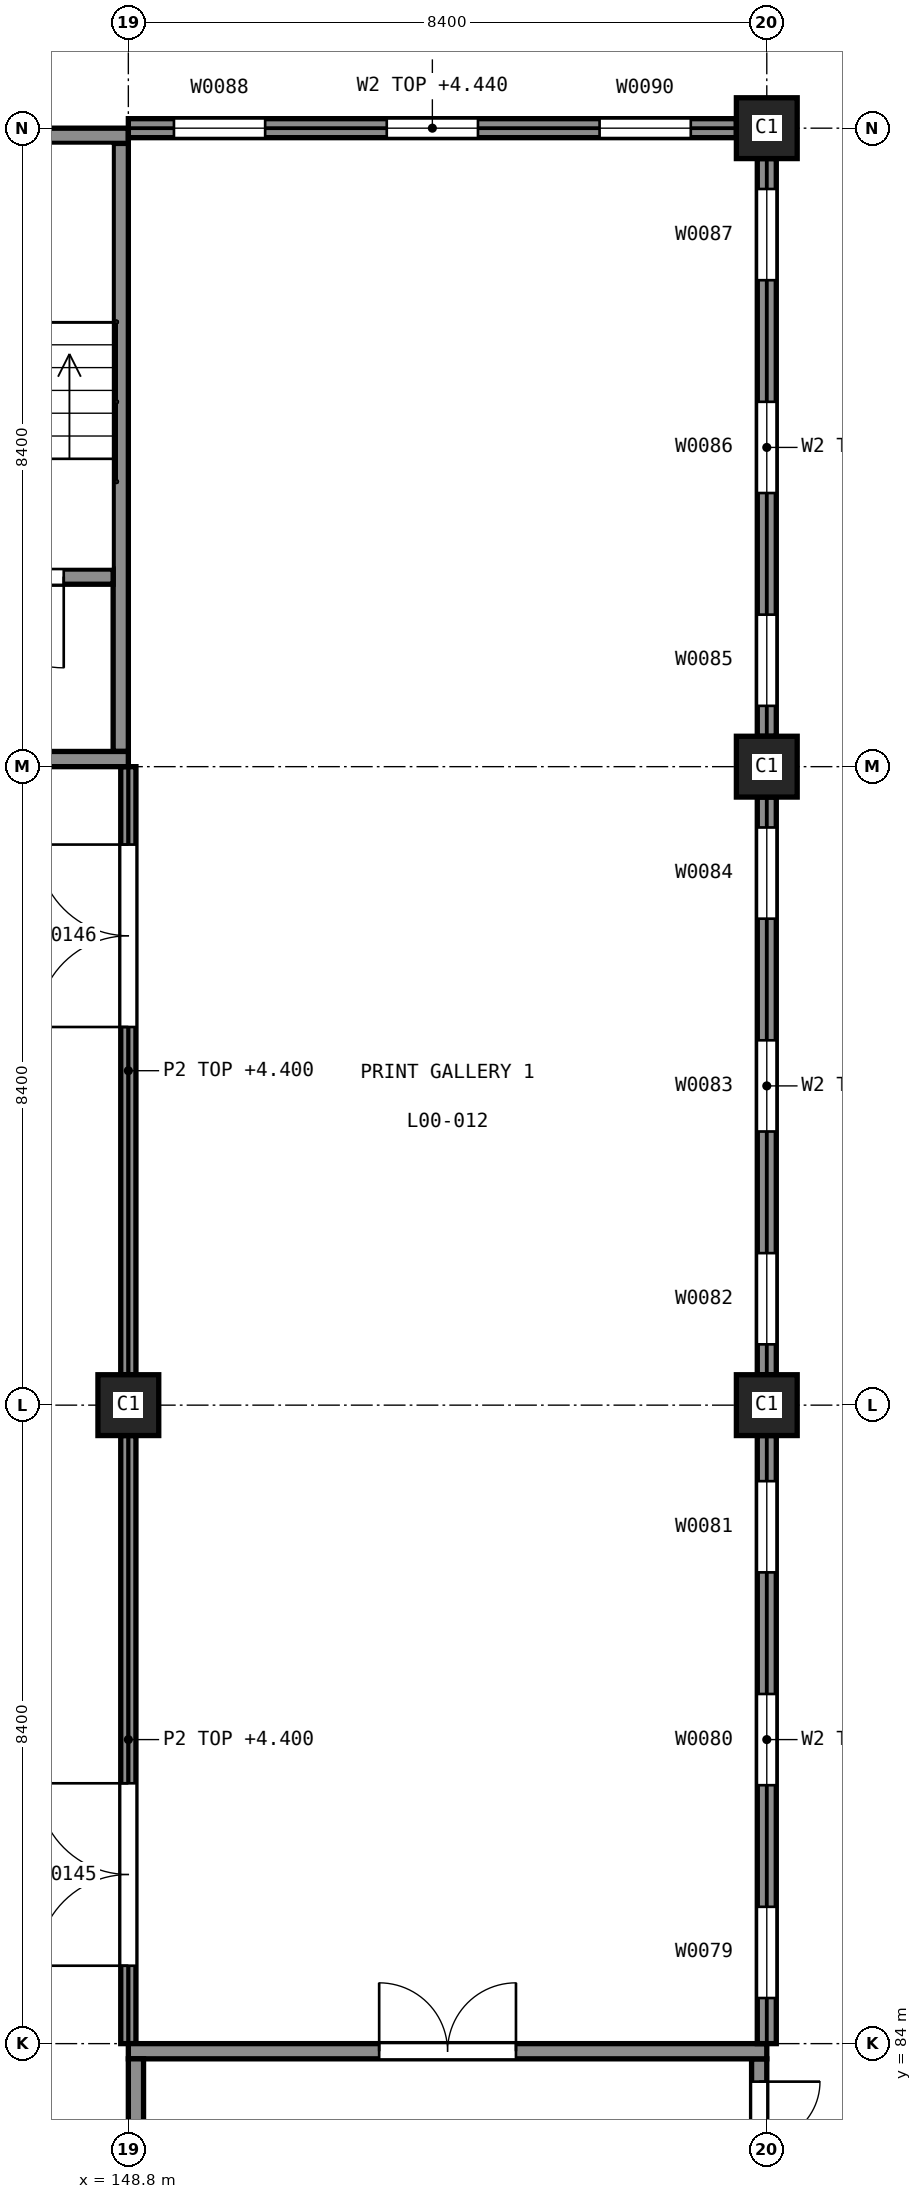
"""IFC4 building model, lengths in metres.
Left out: names, types, materials, properties, quantities, classifications, styles, units other than length and angle.
Written with IfcOpenShell. Run it as: python <this file> out.ifc"""

import sys

from ifc_helpers import new_model, si_unit, direction, frame, frame_2d, origin, origin_2d, place, context, subcontext, project, spatial, rectangle, extrude, element, fill, save


model = new_model("IFC4")
c1 = context("Model", 3, precision=1e-05, world=origin(), true_north=direction((0.0, 1.0)))
c2 = subcontext(c1, "Body", "Model", "MODEL_VIEW")
j1 = project(units=[si_unit("LENGTHUNIT", "METRE"), si_unit("PLANEANGLEUNIT", "RADIAN")], contexts=[c1])
p1 = place(None, origin())
s1 = spatial("IfcSite", under=j1, at=p1, CompositionType="ELEMENT")
p2 = place(p1, origin())
s2 = spatial("IfcBuilding", under=s1, at=p2, CompositionType="ELEMENT")
p3 = place(p2, origin())
s3 = spatial("IfcBuildingStorey", under=s2, at=p3, CompositionType="ELEMENT", Elevation=0.0)
p4 = place(p3, frame((140.4, 100.9, -1.8), z_axis=(0.0, 0.0, 1.0), x_axis=(1.0, 0.0, 0.0)))
e1 = element("IfcWall", 1, at=p4, inside=s3, PredefinedType="SHEAR", context=c2, shape_type="SweptSolid", body=[
    extrude(rectangle(XDim=8.4, YDim=0.2, at=frame_2d((4.2, 0.0))), origin(), (0.0, 0.0, 1.0), 7.3),
])
p5 = place(p4, frame((3.3, 0.0, 1.8)))
e2 = element("IfcOpeningElement", 2, at=p5, cuts=e1, PredefinedType="OPENING", context=c2, shape_type="SweptSolid", body=[
    extrude(rectangle(XDim=1.8, YDim=2.1, at=frame_2d((0.9, 1.05))), frame((0.0, 0.11, 0.0), z_axis=(0.0, -1.0, 0.0), x_axis=(1.0, 0.0, 0.0)), (0.0, 0.0, 1.0), 0.22),
])
p6 = place(p3, frame((140.4, 109.1, -1.8), z_axis=(0.0, 0.0, 1.0), x_axis=(1.0, 0.0, 0.0)))
e3 = element("IfcWall", 3, at=p6, inside=s3, PredefinedType="SHEAR", context=c2, shape_type="SweptSolid", body=[
    extrude(rectangle(XDim=8.4, YDim=0.2, at=frame_2d((4.2, 0.0))), origin(), (0.0, 0.0, 1.0), 7.3),
])
p7 = place(p6, frame((3.001, 0.0, 1.8)))
e4 = element("IfcOpeningElement", 4, at=p7, cuts=e3, PredefinedType="OPENING", context=c2, shape_type="SweptSolid", body=[
    extrude(rectangle(XDim=2.4, YDim=2.1, at=frame_2d((1.2, 1.05))), frame((0.0, 0.11, 0.0), z_axis=(0.0, -1.0, 0.0), x_axis=(1.0, 0.0, 0.0)), (0.0, 0.0, 1.0), 0.22),
])
p8 = place(p3, frame((148.7, 101.0, -1.8), z_axis=(0.0, 0.0, 1.0), x_axis=(0.0, 1.0, 0.0)))
e5 = element("IfcWall", 5, at=p8, inside=s3, PredefinedType="SHEAR", context=c2, shape_type="SweptSolid", body=[
    extrude(rectangle(XDim=8.0, YDim=0.2, at=frame_2d((4.0, 0.0))), origin(), (0.0, 0.0, 1.0), 7.3),
])
p9 = place(p3, frame((140.6, 103.3, -1.8), z_axis=(0.0, 0.0, 1.0), x_axis=(1.0, 0.0, 0.0)))
e6 = element("IfcWall", 6, at=p9, inside=s3, PredefinedType="SHEAR", context=c2, shape_type="SweptSolid", body=[
    extrude(rectangle(XDim=8.0, YDim=0.2, at=frame_2d((4.0, 0.0))), origin(), (0.0, 0.0, 1.0), 7.3),
])
p10 = place(p9, frame((0.65, 0.0, 1.8)))
e7 = element("IfcOpeningElement", 7, at=p10, cuts=e6, PredefinedType="OPENING", context=c2, shape_type="SweptSolid", body=[
    extrude(rectangle(XDim=1.2, YDim=2.1, at=frame_2d((0.6, 1.05))), frame((0.0, 0.11, 0.0), z_axis=(0.0, -1.0, 0.0), x_axis=(1.0, 0.0, 0.0)), (0.0, 0.0, 1.0), 0.22),
])
p11 = place(p9, frame((6.15, 0.0, 1.8)))
e8 = element("IfcOpeningElement", 8, at=p11, cuts=e6, PredefinedType="OPENING", context=c2, shape_type="SweptSolid", body=[
    extrude(rectangle(XDim=1.2, YDim=2.1, at=frame_2d((0.6, 1.05))), frame((0.0, 0.11, 0.0), z_axis=(0.0, -1.0, 0.0), x_axis=(1.0, 0.0, 0.0)), (0.0, 0.0, 1.0), 0.22),
])
p12 = place(p3, frame((148.8, 83.9, -1.8), z_axis=(0.0, 0.0, 1.0), x_axis=(1.0, 0.0, 0.0)))
e9 = element("IfcWall", 9, at=p12, inside=s3, PredefinedType="SHEAR", context=c2, shape_type="SweptSolid", body=[
    extrude(rectangle(XDim=8.4, YDim=0.2, at=frame_2d((4.2, 0.0))), origin(), (0.0, 0.0, 1.0), 7.3),
])
p13 = place(p12, frame((3.3, 0.0, 1.8)))
e10 = element("IfcOpeningElement", 10, at=p13, cuts=e9, PredefinedType="OPENING", context=c2, shape_type="SweptSolid", body=[
    extrude(rectangle(XDim=1.8, YDim=2.1, at=frame_2d((0.9, 1.05))), frame((0.0, 0.11, 0.0), z_axis=(0.0, -1.0, 0.0), x_axis=(1.0, 0.0, 0.0)), (0.0, 0.0, 1.0), 0.22),
])
p14 = place(p3, frame((148.9, 75.8, -1.8), z_axis=(0.0, 0.0, 1.0), x_axis=(0.0, 1.0, 0.0)))
e11 = element("IfcWall", 11, at=p14, inside=s3, PredefinedType="SHEAR", context=c2, shape_type="SweptSolid", body=[
    extrude(rectangle(XDim=8.0, YDim=0.2, at=frame_2d((4.0, 0.0))), origin(), (0.0, 0.0, 1.0), 7.3),
])
p15 = place(p3, frame((157.1, 83.8, -1.8), z_axis=(0.0, 0.0, 1.0), x_axis=(0.0, -1.0, 0.0)))
e12 = element("IfcWall", 12, at=p15, inside=s3, PredefinedType="SHEAR", context=c2, shape_type="SweptSolid", body=[
    extrude(rectangle(XDim=8.0, YDim=0.2, at=frame_2d((4.0, 0.0))), origin(), (0.0, 0.0, 1.0), 7.3),
])
p16 = place(p15, frame((0.3, 0.0, 1.8)))
e13 = element("IfcOpeningElement", 13, at=p16, cuts=e12, PredefinedType="OPENING", context=c2, shape_type="SweptSolid", body=[
    extrude(rectangle(XDim=1.6, YDim=2.1, at=frame_2d((0.8, 1.05))), frame((0.0, 0.11, 0.0), z_axis=(0.0, -1.0, 0.0), x_axis=(1.0, 0.0, 0.0)), (0.0, 0.0, 1.0), 0.22),
])
for number, where, z_axis, x_axis in (
    (14, (148.8, 92.4, -0.3), (0.0, 0.0, 1.0), (1.0, 0.0, 0.0)),
    (15, (157.2, 92.4, -0.3), (0.0, 0.0, 1.0), (1.0, 0.0, 0.0)),
    (16, (157.2, 100.8, -0.3), (0.0, 0.0, 1.0), (1.0, 0.0, 0.0)),
    (17, (157.2, 109.2, -0.3), (0.0, 0.0, 1.0), (1.0, 0.0, 0.0)),
):
    element("IfcColumn", number, at=place(p3, frame(where, z_axis=z_axis, x_axis=x_axis)), inside=s3, PredefinedType="COLUMN", context=c2, shape_type="SweptSolid", body=[
        extrude(rectangle(XDim=0.8, YDim=0.8, at=origin_2d()), origin(), (0.0, 0.0, 1.0), 5.8),
    ])
p17 = place(p3, frame((157.2, 84.0, 0.0), z_axis=(0.0, 0.0, 1.0), x_axis=(0.0, 1.0, 0.0)))
e18 = element("IfcWall", 18, at=p17, inside=s3, PredefinedType="SOLIDWALL", context=c2, shape_type="SweptSolid", body=[
    extrude(rectangle(XDim=8.0, YDim=0.25, at=frame_2d((4.0, 0.0))), origin(), (0.0, 0.0, 1.0), 4.44),
])
p18 = place(p17, frame((0.6, 0.0, 0.9)))
e19 = element("IfcOpeningElement", 19, at=p18, cuts=e18, PredefinedType="OPENING", context=c2, shape_type="SweptSolid", body=[
    extrude(rectangle(XDim=1.2, YDim=2.1, at=frame_2d((0.6, 1.05))), frame((0.0, 0.135, 0.0), z_axis=(0.0, -1.0, 0.0), x_axis=(1.0, 0.0, 0.0)), (0.0, 0.0, 1.0), 0.27),
])
p19 = place(p17, frame((3.4, 0.0, 0.9)))
e20 = element("IfcOpeningElement", 20, at=p19, cuts=e18, PredefinedType="OPENING", context=c2, shape_type="SweptSolid", body=[
    extrude(rectangle(XDim=1.2, YDim=2.1, at=frame_2d((0.6, 1.05))), frame((0.0, 0.135, 0.0), z_axis=(0.0, -1.0, 0.0), x_axis=(1.0, 0.0, 0.0)), (0.0, 0.0, 1.0), 0.27),
])
p20 = place(p17, frame((6.2, 0.0, 0.9)))
e21 = element("IfcOpeningElement", 21, at=p20, cuts=e18, PredefinedType="OPENING", context=c2, shape_type="SweptSolid", body=[
    extrude(rectangle(XDim=1.2, YDim=2.1, at=frame_2d((0.6, 1.05))), frame((0.0, 0.135, 0.0), z_axis=(0.0, -1.0, 0.0), x_axis=(1.0, 0.0, 0.0)), (0.0, 0.0, 1.0), 0.27),
])
p21 = place(p3, frame((157.2, 92.8, 0.0), z_axis=(0.0, 0.0, 1.0), x_axis=(0.0, 1.0, 0.0)))
e22 = element("IfcWall", 22, at=p21, inside=s3, PredefinedType="SOLIDWALL", context=c2, shape_type="SweptSolid", body=[
    extrude(rectangle(XDim=7.6, YDim=0.25, at=frame_2d((3.8, 0.0))), origin(), (0.0, 0.0, 1.0), 4.44),
])
p22 = place(p21, frame((0.4, 0.0, 0.9)))
e23 = element("IfcOpeningElement", 23, at=p22, cuts=e22, PredefinedType="OPENING", context=c2, shape_type="SweptSolid", body=[
    extrude(rectangle(XDim=1.2, YDim=2.1, at=frame_2d((0.6, 1.05))), frame((0.0, 0.135, 0.0), z_axis=(0.0, -1.0, 0.0), x_axis=(1.0, 0.0, 0.0)), (0.0, 0.0, 1.0), 0.27),
])
p23 = place(p21, frame((3.2, 0.0, 0.9)))
e24 = element("IfcOpeningElement", 24, at=p23, cuts=e22, PredefinedType="OPENING", context=c2, shape_type="SweptSolid", body=[
    extrude(rectangle(XDim=1.2, YDim=2.1, at=frame_2d((0.6, 1.05))), frame((0.0, 0.135, 0.0), z_axis=(0.0, -1.0, 0.0), x_axis=(1.0, 0.0, 0.0)), (0.0, 0.0, 1.0), 0.27),
])
p24 = place(p21, frame((6.0, 0.0, 0.9)))
e25 = element("IfcOpeningElement", 25, at=p24, cuts=e22, PredefinedType="OPENING", context=c2, shape_type="SweptSolid", body=[
    extrude(rectangle(XDim=1.2, YDim=2.1, at=frame_2d((0.6, 1.05))), frame((0.0, 0.135, 0.0), z_axis=(0.0, -1.0, 0.0), x_axis=(1.0, 0.0, 0.0)), (0.0, 0.0, 1.0), 0.27),
])
p25 = place(p3, frame((157.2, 101.2, 0.0), z_axis=(0.0, 0.0, 1.0), x_axis=(0.0, 1.0, 0.0)))
e26 = element("IfcWall", 26, at=p25, inside=s3, PredefinedType="SOLIDWALL", context=c2, shape_type="SweptSolid", body=[
    extrude(rectangle(XDim=7.6, YDim=0.25, at=frame_2d((3.8, 0.0))), origin(), (0.0, 0.0, 1.0), 4.44),
])
p26 = place(p25, frame((0.4, 0.0, 0.9)))
e27 = element("IfcOpeningElement", 27, at=p26, cuts=e26, PredefinedType="OPENING", context=c2, shape_type="SweptSolid", body=[
    extrude(rectangle(XDim=1.2, YDim=2.1, at=frame_2d((0.6, 1.05))), frame((0.0, 0.135, 0.0), z_axis=(0.0, -1.0, 0.0), x_axis=(1.0, 0.0, 0.0)), (0.0, 0.0, 1.0), 0.27),
])
p27 = place(p25, frame((3.2, 0.0, 0.9)))
e28 = element("IfcOpeningElement", 28, at=p27, cuts=e26, PredefinedType="OPENING", context=c2, shape_type="SweptSolid", body=[
    extrude(rectangle(XDim=1.2, YDim=2.1, at=frame_2d((0.6, 1.05))), frame((0.0, 0.135, 0.0), z_axis=(0.0, -1.0, 0.0), x_axis=(1.0, 0.0, 0.0)), (0.0, 0.0, 1.0), 0.27),
])
p28 = place(p25, frame((6.0, 0.0, 0.9)))
e29 = element("IfcOpeningElement", 29, at=p28, cuts=e26, PredefinedType="OPENING", context=c2, shape_type="SweptSolid", body=[
    extrude(rectangle(XDim=1.2, YDim=2.1, at=frame_2d((0.6, 1.05))), frame((0.0, 0.135, 0.0), z_axis=(0.0, -1.0, 0.0), x_axis=(1.0, 0.0, 0.0)), (0.0, 0.0, 1.0), 0.27),
])
p29 = place(p3, frame((148.8, 109.2, 0.0), z_axis=(0.0, 0.0, 1.0), x_axis=(1.0, 0.0, 0.0)))
e30 = element("IfcWall", 30, at=p29, inside=s3, PredefinedType="SOLIDWALL", context=c2, shape_type="SweptSolid", body=[
    extrude(rectangle(XDim=8.0, YDim=0.25, at=frame_2d((4.0, 0.0))), origin(), (0.0, 0.0, 1.0), 4.44),
])
p30 = place(p29, frame((0.6, 0.0, 0.9)))
e31 = element("IfcOpeningElement", 31, at=p30, cuts=e30, PredefinedType="OPENING", context=c2, shape_type="SweptSolid", body=[
    extrude(rectangle(XDim=1.2, YDim=2.1, at=frame_2d((0.6, 1.05))), frame((0.0, 0.135, 0.0), z_axis=(0.0, -1.0, 0.0), x_axis=(1.0, 0.0, 0.0)), (0.0, 0.0, 1.0), 0.27),
])
p31 = place(p29, frame((3.4, 0.0, 0.9)))
e32 = element("IfcOpeningElement", 32, at=p31, cuts=e30, PredefinedType="OPENING", context=c2, shape_type="SweptSolid", body=[
    extrude(rectangle(XDim=1.2, YDim=2.1, at=frame_2d((0.6, 1.05))), frame((0.0, 0.135, 0.0), z_axis=(0.0, -1.0, 0.0), x_axis=(1.0, 0.0, 0.0)), (0.0, 0.0, 1.0), 0.27),
])
p32 = place(p29, frame((6.2, 0.0, 0.9)))
e33 = element("IfcOpeningElement", 33, at=p32, cuts=e30, PredefinedType="OPENING", context=c2, shape_type="SweptSolid", body=[
    extrude(rectangle(XDim=1.2, YDim=2.1, at=frame_2d((0.6, 1.05))), frame((0.0, 0.135, 0.0), z_axis=(0.0, -1.0, 0.0), x_axis=(1.0, 0.0, 0.0)), (0.0, 0.0, 1.0), 0.27),
])
p33 = place(p3, frame((148.8, 84.0, 0.0), z_axis=(0.0, 0.0, 1.0), x_axis=(0.0, 1.0, 0.0)))
e34 = element("IfcWall", 34, at=p33, inside=s3, PredefinedType="PARTITIONING", context=c2, shape_type="SweptSolid", body=[
    extrude(rectangle(XDim=8.0, YDim=0.2, at=frame_2d((4.0, 0.0))), origin(), (0.0, 0.0, 1.0), 4.4),
])
p34 = place(p33, frame((1.025, 0.0, 0.0)))
e35 = element("IfcOpeningElement", 35, at=p34, cuts=e34, PredefinedType="OPENING", context=c2, shape_type="SweptSolid", body=[
    extrude(rectangle(XDim=2.4, YDim=2.4, at=frame_2d((1.2, 1.2))), frame((0.0, 0.11, 0.0), z_axis=(0.0, -1.0, 0.0), x_axis=(1.0, 0.0, 0.0)), (0.0, 0.0, 1.0), 0.22),
])
p35 = place(p3, frame((148.8, 92.8, 0.0), z_axis=(0.0, 0.0, 1.0), x_axis=(0.0, 1.0, 0.0)))
e36 = element("IfcWall", 36, at=p35, inside=s3, PredefinedType="PARTITIONING", context=c2, shape_type="SweptSolid", body=[
    extrude(rectangle(XDim=8.0, YDim=0.2, at=frame_2d((4.0, 0.0))), origin(), (0.0, 0.0, 1.0), 4.4),
])
p36 = place(p35, frame((4.575, 0.0, 0.0)))
e37 = element("IfcOpeningElement", 37, at=p36, cuts=e36, PredefinedType="OPENING", context=c2, shape_type="SweptSolid", body=[
    extrude(rectangle(XDim=2.4, YDim=2.4, at=frame_2d((1.2, 1.2))), frame((0.0, 0.11, 0.0), z_axis=(0.0, -1.0, 0.0), x_axis=(1.0, 0.0, 0.0)), (0.0, 0.0, 1.0), 0.22),
])
p37 = place(p18, origin())
e38 = element("IfcWindow", 38, at=p37, inside=s3, PartitioningType="SINGLE_PANEL", PredefinedType="WINDOW", context=c2, shape_type="SweptSolid", body=[
    extrude(rectangle(XDim=1.2, YDim=2.1, at=frame_2d((0.6, 1.05))), frame((0.0, 0.105, 0.0), z_axis=(0.0, -1.0, 0.0), x_axis=(1.0, 0.0, 0.0)), (0.0, 0.0, 1.0), 0.06),
])
fill(e19, e38)
p38 = place(p19, origin())
e39 = element("IfcWindow", 39, at=p38, inside=s3, PartitioningType="SINGLE_PANEL", PredefinedType="WINDOW", context=c2, shape_type="SweptSolid", body=[
    extrude(rectangle(XDim=1.2, YDim=2.1, at=frame_2d((0.6, 1.05))), frame((0.0, 0.105, 0.0), z_axis=(0.0, -1.0, 0.0), x_axis=(1.0, 0.0, 0.0)), (0.0, 0.0, 1.0), 0.06),
])
fill(e20, e39)
p39 = place(p20, origin())
e40 = element("IfcWindow", 40, at=p39, inside=s3, PartitioningType="SINGLE_PANEL", PredefinedType="WINDOW", context=c2, shape_type="SweptSolid", body=[
    extrude(rectangle(XDim=1.2, YDim=2.1, at=frame_2d((0.6, 1.05))), frame((0.0, 0.105, 0.0), z_axis=(0.0, -1.0, 0.0), x_axis=(1.0, 0.0, 0.0)), (0.0, 0.0, 1.0), 0.06),
])
fill(e21, e40)
p40 = place(p22, origin())
e41 = element("IfcWindow", 41, at=p40, inside=s3, PartitioningType="SINGLE_PANEL", PredefinedType="WINDOW", context=c2, shape_type="SweptSolid", body=[
    extrude(rectangle(XDim=1.2, YDim=2.1, at=frame_2d((0.6, 1.05))), frame((0.0, 0.105, 0.0), z_axis=(0.0, -1.0, 0.0), x_axis=(1.0, 0.0, 0.0)), (0.0, 0.0, 1.0), 0.06),
])
fill(e23, e41)
p41 = place(p23, origin())
e42 = element("IfcWindow", 42, at=p41, inside=s3, PartitioningType="SINGLE_PANEL", PredefinedType="WINDOW", context=c2, shape_type="SweptSolid", body=[
    extrude(rectangle(XDim=1.2, YDim=2.1, at=frame_2d((0.6, 1.05))), frame((0.0, 0.105, 0.0), z_axis=(0.0, -1.0, 0.0), x_axis=(1.0, 0.0, 0.0)), (0.0, 0.0, 1.0), 0.06),
])
fill(e24, e42)
p42 = place(p24, origin())
e43 = element("IfcWindow", 43, at=p42, inside=s3, PartitioningType="SINGLE_PANEL", PredefinedType="WINDOW", context=c2, shape_type="SweptSolid", body=[
    extrude(rectangle(XDim=1.2, YDim=2.1, at=frame_2d((0.6, 1.05))), frame((0.0, 0.105, 0.0), z_axis=(0.0, -1.0, 0.0), x_axis=(1.0, 0.0, 0.0)), (0.0, 0.0, 1.0), 0.06),
])
fill(e25, e43)
p43 = place(p26, origin())
e44 = element("IfcWindow", 44, at=p43, inside=s3, PartitioningType="SINGLE_PANEL", PredefinedType="WINDOW", context=c2, shape_type="SweptSolid", body=[
    extrude(rectangle(XDim=1.2, YDim=2.1, at=frame_2d((0.6, 1.05))), frame((0.0, 0.105, 0.0), z_axis=(0.0, -1.0, 0.0), x_axis=(1.0, 0.0, 0.0)), (0.0, 0.0, 1.0), 0.06),
])
fill(e27, e44)
p44 = place(p27, origin())
e45 = element("IfcWindow", 45, at=p44, inside=s3, PartitioningType="SINGLE_PANEL", PredefinedType="WINDOW", context=c2, shape_type="SweptSolid", body=[
    extrude(rectangle(XDim=1.2, YDim=2.1, at=frame_2d((0.6, 1.05))), frame((0.0, 0.105, 0.0), z_axis=(0.0, -1.0, 0.0), x_axis=(1.0, 0.0, 0.0)), (0.0, 0.0, 1.0), 0.06),
])
fill(e28, e45)
p45 = place(p28, origin())
e46 = element("IfcWindow", 46, at=p45, inside=s3, PartitioningType="SINGLE_PANEL", PredefinedType="WINDOW", context=c2, shape_type="SweptSolid", body=[
    extrude(rectangle(XDim=1.2, YDim=2.1, at=frame_2d((0.6, 1.05))), frame((0.0, 0.105, 0.0), z_axis=(0.0, -1.0, 0.0), x_axis=(1.0, 0.0, 0.0)), (0.0, 0.0, 1.0), 0.06),
])
fill(e29, e46)
p46 = place(p30, origin())
e47 = element("IfcWindow", 47, at=p46, inside=s3, PartitioningType="SINGLE_PANEL", PredefinedType="WINDOW", context=c2, shape_type="SweptSolid", body=[
    extrude(rectangle(XDim=1.2, YDim=2.1, at=frame_2d((0.6, 1.05))), frame((0.0, -0.045, 0.0), z_axis=(0.0, -1.0, 0.0), x_axis=(1.0, 0.0, 0.0)), (0.0, 0.0, 1.0), 0.06),
])
fill(e31, e47)
p47 = place(p31, origin())
e48 = element("IfcWindow", 48, at=p47, inside=s3, PartitioningType="SINGLE_PANEL", PredefinedType="WINDOW", context=c2, shape_type="SweptSolid", body=[
    extrude(rectangle(XDim=1.2, YDim=2.1, at=frame_2d((0.6, 1.05))), frame((0.0, -0.045, 0.0), z_axis=(0.0, -1.0, 0.0), x_axis=(1.0, 0.0, 0.0)), (0.0, 0.0, 1.0), 0.06),
])
fill(e32, e48)
p48 = place(p32, origin())
e49 = element("IfcWindow", 49, at=p48, inside=s3, PartitioningType="SINGLE_PANEL", PredefinedType="WINDOW", context=c2, shape_type="SweptSolid", body=[
    extrude(rectangle(XDim=1.2, YDim=2.1, at=frame_2d((0.6, 1.05))), frame((0.0, -0.045, 0.0), z_axis=(0.0, -1.0, 0.0), x_axis=(1.0, 0.0, 0.0)), (0.0, 0.0, 1.0), 0.06),
])
fill(e33, e49)
p49 = place(p16, origin())
e50 = element("IfcDoor", 50, at=p49, inside=s3, OperationType="DOUBLE_DOOR_SINGLE_SWING", PredefinedType="DOOR", context=c2, shape_type="SweptSolid", body=[
    extrude(rectangle(XDim=1.6, YDim=2.1, at=frame_2d((0.8, 1.05))), frame((0.0, 0.025, 0.0), z_axis=(0.0, -1.0, 0.0), x_axis=(1.0, 0.0, 0.0)), (0.0, 0.0, 1.0), 0.05),
])
fill(e13, e50)
p50 = place(p34, origin())
e51 = element("IfcDoor", 51, at=p50, inside=s3, OperationType="DOUBLE_DOOR_SINGLE_SWING", PredefinedType="DOOR", context=c2, shape_type="SweptSolid", body=[
    extrude(rectangle(XDim=2.4, YDim=2.4, at=frame_2d((1.2, 1.2))), frame((0.0, 0.025, 0.0), z_axis=(0.0, -1.0, 0.0), x_axis=(1.0, 0.0, 0.0)), (0.0, 0.0, 1.0), 0.05),
])
fill(e35, e51)
p51 = place(p36, origin())
e52 = element("IfcDoor", 52, at=p51, inside=s3, OperationType="DOUBLE_DOOR_SINGLE_SWING", PredefinedType="DOOR", context=c2, shape_type="SweptSolid", body=[
    extrude(rectangle(XDim=2.4, YDim=2.4, at=frame_2d((1.2, 1.2))), frame((0.0, 0.025, 0.0), z_axis=(0.0, -1.0, 0.0), x_axis=(1.0, 0.0, 0.0)), (0.0, 0.0, 1.0), 0.05),
])
fill(e37, e52)
p52 = place(p11, origin())
e53 = element("IfcDoor", 53, at=p52, inside=s3, OperationType="SINGLE_SWING_RIGHT", PredefinedType="DOOR", context=c2, shape_type="SweptSolid", body=[
    extrude(rectangle(XDim=1.2, YDim=2.1, at=frame_2d((0.6, 1.05))), frame((0.0, 0.025, 0.0), z_axis=(0.0, -1.0, 0.0), x_axis=(1.0, 0.0, 0.0)), (0.0, 0.0, 1.0), 0.05),
])
fill(e8, e53)
p53 = place(p13, origin())
e54 = element("IfcDoor", 54, at=p53, inside=s3, OperationType="DOUBLE_DOOR_SINGLE_SWING", PredefinedType="DOOR", context=c2, shape_type="SweptSolid", body=[
    extrude(rectangle(XDim=1.8, YDim=2.1, at=frame_2d((0.9, 1.05))), frame((0.0, 0.025, 0.0), z_axis=(0.0, -1.0, 0.0), x_axis=(1.0, 0.0, 0.0)), (0.0, 0.0, 1.0), 0.05),
])
fill(e10, e54)
save(model, sys.argv[1])
